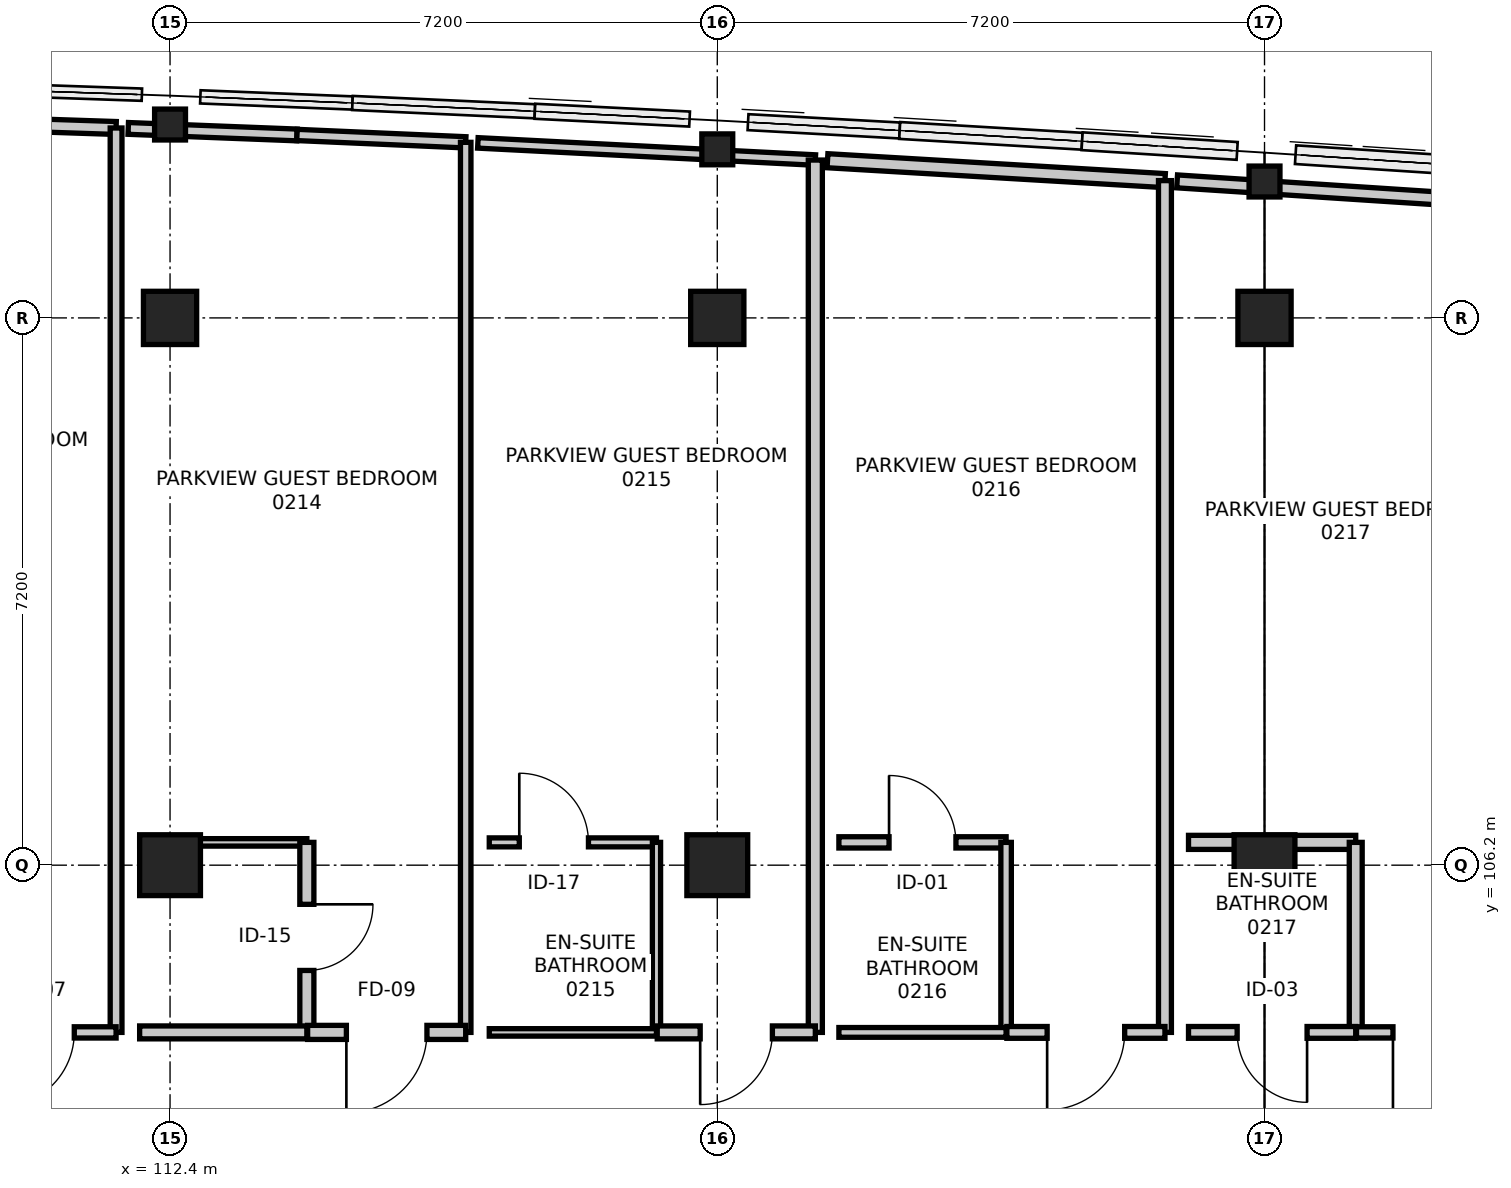
"""IFC4 building model, lengths in metres.
Left out: names, types, materials, properties, quantities, classifications, styles, units other than length and angle.
Written with IfcOpenShell. Run it as: python <this file> out.ifc"""

import sys

from ifc_helpers import new_model, si_unit, direction, frame, frame_2d, origin, origin_2d, place, context, subcontext, project, spatial, rectangle, hollow_circle, extrude, element, fill, save


model = new_model("IFC4")
c1 = context("Model", 3, precision=1e-05, world=origin(), true_north=direction((0.0, 1.0)))
c2 = subcontext(c1, "Body", "Model", "MODEL_VIEW")
j1 = project(units=[si_unit("LENGTHUNIT", "METRE"), si_unit("PLANEANGLEUNIT", "RADIAN")], contexts=[c1])
p1 = place(None, origin())
s1 = spatial("IfcSite", under=j1, at=p1, CompositionType="ELEMENT")
p2 = place(p1, origin())
s2 = spatial("IfcBuilding", under=s1, at=p2, CompositionType="ELEMENT")
p3 = place(p2, frame((0.0, 0.0, 10.5)))
s3 = spatial("IfcBuildingStorey", under=s2, at=p3, CompositionType="ELEMENT", Elevation=10.5)
p4 = place(p3, frame((112.4, 106.2, -0.32), z_axis=(0.0, 0.0, 1.0), x_axis=(1.0, 0.0, 0.0)))
e1 = element("IfcColumn", 1, at=p4, inside=s3, PredefinedType="COLUMN", context=c2, shape_type="SweptSolid", body=[
    extrude(rectangle(XDim=0.8, YDim=0.8, at=origin_2d()), origin(), (0.0, 0.0, 1.0), 4.82),
])
p5 = place(p3, frame((112.4, 113.4, 0.0), z_axis=(0.0, 0.0, 1.0), x_axis=(1.0, 0.0, 0.0)))
e2 = element("IfcColumn", 2, at=p5, inside=s3, PredefinedType="COLUMN", context=c2, shape_type="SweptSolid", body=[
    extrude(rectangle(XDim=0.7, YDim=0.7, at=origin_2d()), origin(), (0.0, 0.0, 1.0), 4.5),
])
p6 = place(p3, frame((112.4, 115.944, 0.0), z_axis=(0.0, 0.0, 1.0), x_axis=(1.0, 0.0, 0.0)))
e3 = element("IfcColumn", 3, at=p6, inside=s3, PredefinedType="COLUMN", context=c2, shape_type="SweptSolid", body=[
    extrude(hollow_circle(Radius=0.203, WallThickness=0.02, at=origin_2d()), origin(), (0.0, 0.0, 1.0), 4.5),
])
p7 = place(p3, frame((119.6, 106.2, 0.0), z_axis=(0.0, 0.0, 1.0), x_axis=(1.0, 0.0, 0.0)))
e4 = element("IfcColumn", 4, at=p7, inside=s3, PredefinedType="COLUMN", context=c2, shape_type="SweptSolid", body=[
    extrude(rectangle(XDim=0.8, YDim=0.8, at=origin_2d()), origin(), (0.0, 0.0, 1.0), 4.5),
])
p8 = place(p3, frame((119.6, 113.4, 0.0), z_axis=(0.0, 0.0, 1.0), x_axis=(1.0, 0.0, 0.0)))
e5 = element("IfcColumn", 5, at=p8, inside=s3, PredefinedType="COLUMN", context=c2, shape_type="SweptSolid", body=[
    extrude(rectangle(XDim=0.7, YDim=0.7, at=origin_2d()), origin(), (0.0, 0.0, 1.0), 4.5),
])
p9 = place(p3, frame((119.6, 115.618, 0.0), z_axis=(0.0, 0.0, 1.0), x_axis=(1.0, 0.0, 0.0)))
e6 = element("IfcColumn", 6, at=p9, inside=s3, PredefinedType="COLUMN", context=c2, shape_type="SweptSolid", body=[
    extrude(hollow_circle(Radius=0.203, WallThickness=0.02, at=origin_2d()), origin(), (0.0, 0.0, 1.0), 4.5),
])
p10 = place(p3, frame((126.8, 106.2, -0.32), z_axis=(0.0, 0.0, 1.0), x_axis=(1.0, 0.0, 0.0)))
e7 = element("IfcColumn", 7, at=p10, inside=s3, PredefinedType="COLUMN", context=c2, shape_type="SweptSolid", body=[
    extrude(rectangle(XDim=0.8, YDim=0.8, at=origin_2d()), origin(), (0.0, 0.0, 1.0), 4.82),
])
p11 = place(p3, frame((126.8, 113.4, 0.0), z_axis=(0.0, 0.0, 1.0), x_axis=(1.0, 0.0, 0.0)))
e8 = element("IfcColumn", 8, at=p11, inside=s3, PredefinedType="COLUMN", context=c2, shape_type="SweptSolid", body=[
    extrude(rectangle(XDim=0.7, YDim=0.7, at=origin_2d()), origin(), (0.0, 0.0, 1.0), 4.5),
])
p12 = place(p3, frame((126.8, 115.194, 0.0), z_axis=(0.0, 0.0, 1.0), x_axis=(1.0, 0.0, 0.0)))
e9 = element("IfcColumn", 9, at=p12, inside=s3, PredefinedType="COLUMN", context=c2, shape_type="SweptSolid", body=[
    extrude(hollow_circle(Radius=0.203, WallThickness=0.02, at=origin_2d()), origin(), (0.0, 0.0, 1.0), 4.5),
])
p13 = place(p3, frame((109.47, 115.972, 0.0), z_axis=(0.0, 0.0, 1.0), x_axis=(0.999448925393, -0.033194058668, 0.0)))
e10 = element("IfcWall", 10, at=p13, inside=s3, PredefinedType="PARTITIONING", context=c2, shape_type="SweptSolid", body=[
    extrude(rectangle(XDim=2.221, YDim=0.17, at=frame_2d((1.111, 0.0))), origin(), (0.0, 0.0, 1.0), 3.796),
])
p14 = place(p3, frame((111.69, 115.898, 0.0), z_axis=(0.0, 0.0, 1.0), x_axis=(0.0, -1.0, 0.0)))
e11 = element("IfcWall", 11, at=p14, inside=s3, PredefinedType="PARTITIONING", context=c2, shape_type="SweptSolid", body=[
    extrude(rectangle(XDim=11.898, YDim=0.155, at=frame_2d((5.949, 0.0))), origin(), (0.0, 0.0, 1.0), 3.455),
])
p15 = place(p3, frame((111.69, 104.0, 0.0), z_axis=(0.0, 0.0, 1.0), x_axis=(-1.0, 0.0, 0.0)))
e12 = element("IfcWall", 12, at=p15, inside=s3, PredefinedType="PARTITIONING", context=c2, shape_type="SweptSolid", body=[
    extrude(rectangle(XDim=2.08, YDim=0.148, at=frame_2d((1.04, 0.0))), origin(), (0.0, 0.0, 1.0), 4.22),
])
p16 = place(p15, frame((0.55, 0.0, 0.0)))
e13 = element("IfcOpeningElement", 13, at=p16, cuts=e12, PredefinedType="OPENING", context=c2, shape_type="SweptSolid", body=[
    extrude(rectangle(XDim=0.98, YDim=2.15, at=frame_2d((0.49, 1.075))), frame((0.0, 0.084, 0.0), z_axis=(0.0, -1.0, 0.0), x_axis=(1.0, 0.0, 0.0)), (0.0, 0.0, 1.0), 0.168),
])
p17 = place(p3, frame((112.0, 106.5, 0.0), z_axis=(0.0, 0.0, 1.0), x_axis=(1.0, 0.0, 0.0)))
e14 = element("IfcWall", 14, at=p17, inside=s3, PredefinedType="PARTITIONING", context=c2, shape_type="SweptSolid", body=[
    extrude(rectangle(XDim=2.2, YDim=0.098, at=frame_2d((1.1, 0.0))), origin(), (0.0, 0.0, 1.0), 3.455),
])
p18 = place(p3, frame((114.2, 106.5, 0.0), z_axis=(0.0, 0.0, 1.0), x_axis=(0.0, -1.0, 0.0)))
e15 = element("IfcWall", 15, at=p18, inside=s3, PredefinedType="PARTITIONING", context=c2, shape_type="SweptSolid", body=[
    extrude(rectangle(XDim=2.5, YDim=0.185, at=frame_2d((1.25, 0.0))), origin(), (0.0, 0.0, 1.0), 3.455),
])
p19 = place(p18, frame((0.815, 0.0, 0.0)))
e16 = element("IfcOpeningElement", 16, at=p19, cuts=e15, PredefinedType="OPENING", context=c2, shape_type="SweptSolid", body=[
    extrude(rectangle(XDim=0.87, YDim=2.07, at=frame_2d((0.435, 1.035))), frame((0.0, 0.103, 0.0), z_axis=(0.0, -1.0, 0.0), x_axis=(1.0, 0.0, 0.0)), (0.0, 0.0, 1.0), 0.205),
])
p20 = place(p3, frame((114.2, 104.0, 0.0), z_axis=(0.0, 0.0, 1.0), x_axis=(-1.0, 0.0, 0.0)))
e17 = element("IfcWall", 17, at=p20, inside=s3, PredefinedType="PARTITIONING", context=c2, shape_type="SweptSolid", body=[
    extrude(rectangle(XDim=2.2, YDim=0.17, at=frame_2d((1.1, 0.0))), origin(), (0.0, 0.0, 1.0), 3.555),
])
p21 = place(p3, frame((111.85, 115.893, 0.0), z_axis=(0.0, 0.0, 1.0), x_axis=(0.999247312878, -0.038791851033, 0.0)))
e18 = element("IfcWall", 18, at=p21, inside=s3, PredefinedType="PARTITIONING", context=c2, shape_type="SweptSolid", body=[
    extrude(rectangle(XDim=2.222, YDim=0.155, at=frame_2d((1.111, 0.0))), origin(), (0.0, 0.0, 1.0), 3.796),
])
p22 = place(p3, frame((114.07, 115.807, 0.0), z_axis=(0.0, 0.0, 1.0), x_axis=(0.999048264452, -0.043618405475, 0.0)))
e19 = element("IfcWall", 19, at=p22, inside=s3, PredefinedType="PARTITIONING", context=c2, shape_type="SweptSolid", body=[
    extrude(rectangle(XDim=2.222, YDim=0.148, at=frame_2d((1.111, 0.0))), origin(), (0.0, 0.0, 1.0), 3.796),
])
p23 = place(p3, frame((116.29, 115.71, 0.0), z_axis=(0.0, 0.0, 1.0), x_axis=(0.0, -1.0, 0.0)))
e20 = element("IfcWall", 20, at=p23, inside=s3, PredefinedType="PARTITIONING", context=c2, shape_type="SweptSolid", body=[
    extrude(rectangle(XDim=11.71, YDim=0.138, at=frame_2d((5.855, 0.0))), origin(), (0.0, 0.0, 1.0), 3.455),
])
p24 = place(p3, frame((116.29, 104.0, 0.0), z_axis=(0.0, 0.0, 1.0), x_axis=(-1.0, 0.0, 0.0)))
e21 = element("IfcWall", 21, at=p24, inside=s3, PredefinedType="PARTITIONING", context=c2, shape_type="SweptSolid", body=[
    extrude(rectangle(XDim=2.08, YDim=0.185, at=frame_2d((1.04, 0.0))), origin(), (0.0, 0.0, 1.0), 4.22),
])
p25 = place(p24, frame((0.51, 0.0, 0.0)))
e22 = element("IfcOpeningElement", 22, at=p25, cuts=e21, PredefinedType="OPENING", context=c2, shape_type="SweptSolid", body=[
    extrude(rectangle(XDim=1.06, YDim=2.2, at=frame_2d((0.53, 1.1))), frame((0.0, 0.103, 0.0), z_axis=(0.0, -1.0, 0.0), x_axis=(1.0, 0.0, 0.0)), (0.0, 0.0, 1.0), 0.205),
])
p26 = place(p3, frame((116.6, 106.5, 0.0), z_axis=(0.0, 0.0, 1.0), x_axis=(1.0, 0.0, 0.0)))
e23 = element("IfcWall", 23, at=p26, inside=s3, PredefinedType="PARTITIONING", context=c2, shape_type="SweptSolid", body=[
    extrude(rectangle(XDim=2.2, YDim=0.118, at=frame_2d((1.1, 0.0))), origin(), (0.0, 0.0, 1.0), 3.455),
])
p27 = place(p26, frame((0.395, 0.0, 0.0)))
e24 = element("IfcOpeningElement", 24, at=p27, cuts=e23, PredefinedType="OPENING", context=c2, shape_type="SweptSolid", body=[
    extrude(rectangle(XDim=0.91, YDim=2.11, at=frame_2d((0.455, 1.055))), frame((0.0, 0.069, 0.0), z_axis=(0.0, -1.0, 0.0), x_axis=(1.0, 0.0, 0.0)), (0.0, 0.0, 1.0), 0.138),
])
p28 = place(p3, frame((118.8, 106.5, 0.0), z_axis=(0.0, 0.0, 1.0), x_axis=(0.0, -1.0, 0.0)))
e25 = element("IfcWall", 25, at=p28, inside=s3, PredefinedType="PARTITIONING", context=c2, shape_type="SweptSolid", body=[
    extrude(rectangle(XDim=2.5, YDim=0.108, at=frame_2d((1.25, 0.0))), origin(), (0.0, 0.0, 1.0), 3.455),
])
p29 = place(p3, frame((118.8, 104.0, 0.0), z_axis=(0.0, 0.0, 1.0), x_axis=(-1.0, 0.0, 0.0)))
e26 = element("IfcWall", 26, at=p29, inside=s3, PredefinedType="PARTITIONING", context=c2, shape_type="SweptSolid", body=[
    extrude(rectangle(XDim=2.2, YDim=0.098, at=frame_2d((1.1, 0.0))), origin(), (0.0, 0.0, 1.0), 4.22),
])
p30 = place(p3, frame((116.45, 115.703, 0.0), z_axis=(0.0, 0.0, 1.0), x_axis=(0.998708966744, -0.050797635227, 0.0)))
e27 = element("IfcWall", 27, at=p30, inside=s3, PredefinedType="PARTITIONING", context=c2, shape_type="SweptSolid", body=[
    extrude(rectangle(XDim=4.446, YDim=0.138, at=frame_2d((2.223, 0.0))), origin(), (0.0, 0.0, 1.0), 3.796),
])
p31 = place(p3, frame((120.89, 115.477, 0.0), z_axis=(0.0, 0.0, 1.0), x_axis=(0.0, -1.0, 0.0)))
e28 = element("IfcWall", 28, at=p31, inside=s3, PredefinedType="PARTITIONING", context=c2, shape_type="SweptSolid", body=[
    extrude(rectangle(XDim=11.477, YDim=0.185, at=frame_2d((5.738, 0.0))), origin(), (0.0, 0.0, 1.0), 3.455),
])
p32 = place(p3, frame((120.89, 104.0, 0.0), z_axis=(0.0, 0.0, 1.0), x_axis=(-1.0, 0.0, 0.0)))
e29 = element("IfcWall", 29, at=p32, inside=s3, PredefinedType="PARTITIONING", context=c2, shape_type="SweptSolid", body=[
    extrude(rectangle(XDim=2.08, YDim=0.17, at=frame_2d((1.04, 0.0))), origin(), (0.0, 0.0, 1.0), 3.555),
])
p33 = place(p32, frame((0.565, 0.0, 0.0)))
e30 = element("IfcOpeningElement", 30, at=p33, cuts=e29, PredefinedType="OPENING", context=c2, shape_type="SweptSolid", body=[
    extrude(rectangle(XDim=0.95, YDim=2.1, at=frame_2d((0.475, 1.05))), frame((0.0, 0.095, 0.0), z_axis=(0.0, -1.0, 0.0), x_axis=(1.0, 0.0, 0.0)), (0.0, 0.0, 1.0), 0.19),
])
p34 = place(p3, frame((121.2, 106.5, 0.0), z_axis=(0.0, 0.0, 1.0), x_axis=(1.0, 0.0, 0.0)))
e31 = element("IfcWall", 31, at=p34, inside=s3, PredefinedType="PARTITIONING", context=c2, shape_type="SweptSolid", body=[
    extrude(rectangle(XDim=2.2, YDim=0.148, at=frame_2d((1.1, 0.0))), origin(), (0.0, 0.0, 1.0), 3.455),
])
p35 = place(p34, frame((0.66, 0.0, 0.0)))
e32 = element("IfcOpeningElement", 32, at=p35, cuts=e31, PredefinedType="OPENING", context=c2, shape_type="SweptSolid", body=[
    extrude(rectangle(XDim=0.88, YDim=2.06, at=frame_2d((0.44, 1.03))), frame((0.0, 0.084, 0.0), z_axis=(0.0, -1.0, 0.0), x_axis=(1.0, 0.0, 0.0)), (0.0, 0.0, 1.0), 0.168),
])
p36 = place(p3, frame((123.4, 106.5, 0.0), z_axis=(0.0, 0.0, 1.0), x_axis=(0.0, -1.0, 0.0)))
e33 = element("IfcWall", 33, at=p36, inside=s3, PredefinedType="PARTITIONING", context=c2, shape_type="SweptSolid", body=[
    extrude(rectangle(XDim=2.5, YDim=0.138, at=frame_2d((1.25, 0.0))), origin(), (0.0, 0.0, 1.0), 3.455),
])
p37 = place(p3, frame((123.4, 104.0, 0.0), z_axis=(0.0, 0.0, 1.0), x_axis=(-1.0, 0.0, 0.0)))
e34 = element("IfcWall", 34, at=p37, inside=s3, PredefinedType="PARTITIONING", context=c2, shape_type="SweptSolid", body=[
    extrude(rectangle(XDim=2.2, YDim=0.128, at=frame_2d((1.1, 0.0))), origin(), (0.0, 0.0, 1.0), 4.22),
])
p38 = place(p3, frame((121.05, 115.468, 0.0), z_axis=(0.0, 0.0, 1.0), x_axis=(0.998267172932, -0.058844298327, 0.0)))
e35 = element("IfcWall", 35, at=p38, inside=s3, PredefinedType="PARTITIONING", context=c2, shape_type="SweptSolid", body=[
    extrude(rectangle(XDim=4.448, YDim=0.185, at=frame_2d((2.224, 0.0))), origin(), (0.0, 0.0, 1.0), 3.796),
])
p39 = place(p3, frame((125.49, 115.206, 0.0), z_axis=(0.0, 0.0, 1.0), x_axis=(0.0, -1.0, 0.0)))
e36 = element("IfcWall", 36, at=p39, inside=s3, PredefinedType="PARTITIONING", context=c2, shape_type="SweptSolid", body=[
    extrude(rectangle(XDim=11.206, YDim=0.17, at=frame_2d((5.603, 0.0))), origin(), (0.0, 0.0, 1.0), 3.455),
])
p40 = place(p3, frame((125.49, 104.0, 0.0), z_axis=(0.0, 0.0, 1.0), x_axis=(-1.0, 0.0, 0.0)))
e37 = element("IfcWall", 37, at=p40, inside=s3, PredefinedType="PARTITIONING", context=c2, shape_type="SweptSolid", body=[
    extrude(rectangle(XDim=2.08, YDim=0.155, at=frame_2d((1.04, 0.0))), origin(), (0.0, 0.0, 1.0), 4.22),
])
p41 = place(p40, frame((0.53, 0.0, 0.0)))
e38 = element("IfcOpeningElement", 38, at=p41, cuts=e37, PredefinedType="OPENING", context=c2, shape_type="SweptSolid", body=[
    extrude(rectangle(XDim=1.02, YDim=2.15, at=frame_2d((0.51, 1.075))), frame((0.0, 0.087, 0.0), z_axis=(0.0, -1.0, 0.0), x_axis=(1.0, 0.0, 0.0)), (0.0, 0.0, 1.0), 0.175),
])
p42 = place(p3, frame((125.8, 106.5, 0.0), z_axis=(0.0, 0.0, 1.0), x_axis=(1.0, 0.0, 0.0)))
e39 = element("IfcWall", 39, at=p42, inside=s3, PredefinedType="PARTITIONING", context=c2, shape_type="SweptSolid", body=[
    extrude(rectangle(XDim=2.2, YDim=0.185, at=frame_2d((1.1, 0.0))), origin(), (0.0, 0.0, 1.0), 3.455),
])
p43 = place(p3, frame((128.0, 106.5, 0.0), z_axis=(0.0, 0.0, 1.0), x_axis=(0.0, -1.0, 0.0)))
e40 = element("IfcWall", 40, at=p43, inside=s3, PredefinedType="PARTITIONING", context=c2, shape_type="SweptSolid", body=[
    extrude(rectangle(XDim=2.5, YDim=0.17, at=frame_2d((1.25, 0.0))), origin(), (0.0, 0.0, 1.0), 3.455),
])
p44 = place(p3, frame((128.0, 104.0, 0.0), z_axis=(0.0, 0.0, 1.0), x_axis=(-1.0, 0.0, 0.0)))
e41 = element("IfcWall", 41, at=p44, inside=s3, PredefinedType="PARTITIONING", context=c2, shape_type="SweptSolid", body=[
    extrude(rectangle(XDim=2.2, YDim=0.155, at=frame_2d((1.1, 0.0))), origin(), (0.0, 0.0, 1.0), 3.555),
])
p45 = place(p44, frame((0.64, 0.0, 0.0)))
e42 = element("IfcOpeningElement", 42, at=p45, cuts=e41, PredefinedType="OPENING", context=c2, shape_type="SweptSolid", body=[
    extrude(rectangle(XDim=0.92, YDim=2.1, at=frame_2d((0.46, 1.05))), frame((0.0, 0.087, 0.0), z_axis=(0.0, -1.0, 0.0), x_axis=(1.0, 0.0, 0.0)), (0.0, 0.0, 1.0), 0.175),
])
p46 = place(p3, frame((125.65, 115.196, 0.0), z_axis=(0.0, 0.0, 1.0), x_axis=(0.997876928912, -0.065127833871, 0.0)))
e43 = element("IfcWall", 43, at=p46, inside=s3, PredefinedType="PARTITIONING", context=c2, shape_type="SweptSolid", body=[
    extrude(rectangle(XDim=4.45, YDim=0.17, at=frame_2d((2.225, 0.0))), origin(), (0.0, 0.0, 1.0), 3.796),
])
p47 = place(p3, frame((130.09, 104.0, 0.0), z_axis=(0.0, 0.0, 1.0), x_axis=(-1.0, 0.0, 0.0)))
e44 = element("IfcWall", 44, at=p47, inside=s3, PredefinedType="PARTITIONING", context=c2, shape_type="SweptSolid", body=[
    extrude(rectangle(XDim=2.08, YDim=0.148, at=frame_2d((1.04, 0.0))), origin(), (0.0, 0.0, 1.0), 4.22),
])
p48 = place(p47, frame((0.48, 0.0, 0.0)))
e45 = element("IfcOpeningElement", 45, at=p48, cuts=e44, PredefinedType="OPENING", context=c2, shape_type="SweptSolid", body=[
    extrude(rectangle(XDim=1.12, YDim=2.2, at=frame_2d((0.56, 1.1))), frame((0.0, 0.084, 0.0), z_axis=(0.0, -1.0, 0.0), x_axis=(1.0, 0.0, 0.0)), (0.0, 0.0, 1.0), 0.168),
])
p49 = place(p16, origin())
e46 = element("IfcDoor", 46, at=p49, inside=s3, OperationType="SINGLE_SWING_RIGHT", PredefinedType="DOOR", context=c2, shape_type="SweptSolid", body=[
    extrude(rectangle(XDim=0.98, YDim=2.15, at=frame_2d((0.49, 1.075))), frame((0.0, 0.025, 0.0), z_axis=(0.0, -1.0, 0.0), x_axis=(1.0, 0.0, 0.0)), (0.0, 0.0, 1.0), 0.05),
])
fill(e13, e46)
p50 = place(p19, origin())
e47 = element("IfcDoor", 47, at=p50, inside=s3, OperationType="SINGLE_SWING_LEFT", PredefinedType="DOOR", context=c2, shape_type="SweptSolid", body=[
    extrude(rectangle(XDim=0.87, YDim=2.07, at=frame_2d((0.435, 1.035))), frame((0.0, 0.025, 0.0), z_axis=(0.0, -1.0, 0.0), x_axis=(1.0, 0.0, 0.0)), (0.0, 0.0, 1.0), 0.05),
])
fill(e16, e47)
p51 = place(p25, origin())
e48 = element("IfcDoor", 48, at=p51, inside=s3, OperationType="SINGLE_SWING_RIGHT", PredefinedType="DOOR", context=c2, shape_type="SweptSolid", body=[
    extrude(rectangle(XDim=1.06, YDim=2.2, at=frame_2d((0.53, 1.1))), frame((0.0, 0.025, 0.0), z_axis=(0.0, -1.0, 0.0), x_axis=(1.0, 0.0, 0.0)), (0.0, 0.0, 1.0), 0.05),
])
fill(e22, e48)
p52 = place(p27, origin())
e49 = element("IfcDoor", 49, at=p52, inside=s3, OperationType="SINGLE_SWING_LEFT", PredefinedType="DOOR", context=c2, shape_type="SweptSolid", body=[
    extrude(rectangle(XDim=0.91, YDim=2.11, at=frame_2d((0.455, 1.055))), frame((0.0, 0.025, 0.0), z_axis=(0.0, -1.0, 0.0), x_axis=(1.0, 0.0, 0.0)), (0.0, 0.0, 1.0), 0.05),
])
fill(e24, e49)
p53 = place(p33, origin())
e50 = element("IfcDoor", 50, at=p53, inside=s3, OperationType="SINGLE_SWING_RIGHT", PredefinedType="DOOR", context=c2, shape_type="SweptSolid", body=[
    extrude(rectangle(XDim=0.95, YDim=2.1, at=frame_2d((0.475, 1.05))), frame((0.0, 0.025, 0.0), z_axis=(0.0, -1.0, 0.0), x_axis=(1.0, 0.0, 0.0)), (0.0, 0.0, 1.0), 0.05),
])
fill(e30, e50)
p54 = place(p35, origin())
e51 = element("IfcDoor", 51, at=p54, inside=s3, OperationType="SINGLE_SWING_LEFT", PredefinedType="DOOR", context=c2, shape_type="SweptSolid", body=[
    extrude(rectangle(XDim=0.88, YDim=2.06, at=frame_2d((0.44, 1.03))), frame((0.0, 0.025, 0.0), z_axis=(0.0, -1.0, 0.0), x_axis=(1.0, 0.0, 0.0)), (0.0, 0.0, 1.0), 0.05),
])
fill(e32, e51)
p55 = place(p41, origin())
e52 = element("IfcDoor", 52, at=p55, inside=s3, OperationType="SINGLE_SWING_RIGHT", PredefinedType="DOOR", context=c2, shape_type="SweptSolid", body=[
    extrude(rectangle(XDim=1.02, YDim=2.15, at=frame_2d((0.51, 1.075))), frame((0.0, 0.025, 0.0), z_axis=(0.0, -1.0, 0.0), x_axis=(1.0, 0.0, 0.0)), (0.0, 0.0, 1.0), 0.05),
])
fill(e38, e52)
p56 = place(p45, origin())
e53 = element("IfcDoor", 53, at=p56, inside=s3, OperationType="SINGLE_SWING_LEFT", PredefinedType="DOOR", context=c2, shape_type="SweptSolid", body=[
    extrude(rectangle(XDim=0.92, YDim=2.1, at=frame_2d((0.46, 1.05))), frame((0.0, 0.025, 0.0), z_axis=(0.0, -1.0, 0.0), x_axis=(1.0, 0.0, 0.0)), (0.0, 0.0, 1.0), 0.05),
])
fill(e42, e53)
p57 = place(p48, origin())
e54 = element("IfcDoor", 54, at=p57, inside=s3, OperationType="SINGLE_SWING_RIGHT", PredefinedType="DOOR", context=c2, shape_type="SweptSolid", body=[
    extrude(rectangle(XDim=1.12, YDim=2.2, at=frame_2d((0.56, 1.1))), frame((0.0, 0.025, 0.0), z_axis=(0.0, -1.0, 0.0), x_axis=(1.0, 0.0, 0.0)), (0.0, 0.0, 1.0), 0.05),
])
fill(e45, e54)
save(model, sys.argv[1])
